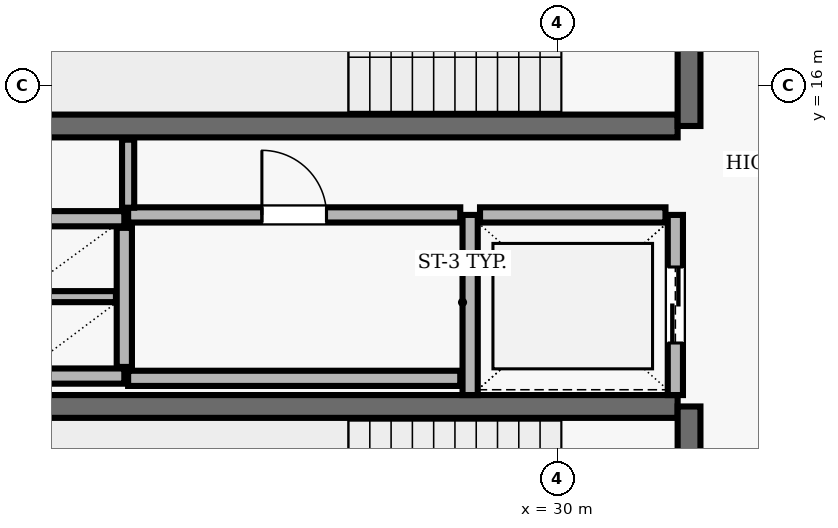
"""IFC4 building model, lengths in metres.
Left out: names, types, materials, properties, quantities, classifications, styles, units other than length and angle.
Written with IfcOpenShell. Run it as: python <this file> out.ifc"""

import sys

from ifc_helpers import new_model, si_unit, direction, frame, frame_2d, origin, place, context, subcontext, project, spatial, rectangle, extrude, element, fill, save


model = new_model("IFC4")
c1 = context("Model", 3, precision=1e-05, world=origin(), true_north=direction((0.0, 1.0)))
c2 = subcontext(c1, "Body", "Model", "MODEL_VIEW")
j1 = project(units=[si_unit("LENGTHUNIT", "METRE"), si_unit("PLANEANGLEUNIT", "RADIAN")], contexts=[c1])
p1 = place(None, origin())
s1 = spatial("IfcSite", under=j1, at=p1, CompositionType="ELEMENT")
p2 = place(p1, origin())
s2 = spatial("IfcBuilding", under=s1, at=p2, CompositionType="ELEMENT")
p3 = place(p2, frame((0.0, 0.0, 248.2)))
s3 = spatial("IfcBuildingStorey", under=s2, at=p3, CompositionType="ELEMENT", Elevation=248.2)
p4 = place(p3, frame((23.22, 15.47, 0.0), z_axis=(0.0, 0.0, 1.0), x_axis=(1.0, 0.0, 0.0)))
e1 = element("IfcWall", 1, at=p4, inside=s3, PredefinedType="SHEAR", context=c2, shape_type="SweptSolid", body=[
    extrude(rectangle(XDim=8.36, YDim=0.3, at=frame_2d((4.18, 0.0))), origin(), (0.0, 0.0, 1.0), 3.69),
])
p5 = place(p3, frame((31.73, 15.47, 0.0), z_axis=(0.0, 0.0, 1.0), x_axis=(0.0, 1.0, 0.0)))
e2 = element("IfcWall", 2, at=p5, inside=s3, PredefinedType="SHEAR", context=c2, shape_type="SweptSolid", body=[
    extrude(rectangle(XDim=3.51, YDim=0.3, at=frame_2d((1.755, 0.0))), origin(), (0.0, 0.0, 1.0), 3.69),
])
p6 = place(p5, frame((1.18, 0.0, 0.0)))
e3 = element("IfcOpeningElement", 3, at=p6, cuts=e2, PredefinedType="OPENING", context=c2, shape_type="SweptSolid", body=[
    extrude(rectangle(XDim=1.15, YDim=2.15, at=frame_2d((0.575, 1.075))), frame((0.0, 0.16, 0.0), z_axis=(0.0, -1.0, 0.0), x_axis=(1.0, 0.0, 0.0)), (0.0, 0.0, 1.0), 0.32),
])
p7 = place(p3, frame((31.58, 11.78, 0.0), z_axis=(0.0, 0.0, 1.0), x_axis=(-1.0, 0.0, 0.0)))
e4 = element("IfcWall", 4, at=p7, inside=s3, PredefinedType="SHEAR", context=c2, shape_type="SweptSolid", body=[
    extrude(rectangle(XDim=8.36, YDim=0.3, at=frame_2d((4.18, 0.0))), origin(), (0.0, 0.0, 1.0), 3.69),
])
p8 = place(p3, frame((31.73, 8.27, 0.0), z_axis=(0.0, 0.0, 1.0), x_axis=(0.0, 1.0, 0.0)))
e5 = element("IfcWall", 5, at=p8, inside=s3, PredefinedType="SHEAR", context=c2, shape_type="SweptSolid", body=[
    extrude(rectangle(XDim=3.51, YDim=0.3, at=frame_2d((1.755, 0.0))), origin(), (0.0, 0.0, 1.0), 3.69),
])
p9 = place(p8, frame((1.18, 0.0, 0.0)))
e6 = element("IfcOpeningElement", 6, at=p9, cuts=e5, PredefinedType="OPENING", context=c2, shape_type="SweptSolid", body=[
    extrude(rectangle(XDim=1.15, YDim=2.15, at=frame_2d((0.575, 1.075))), frame((0.0, 0.16, 0.0), z_axis=(0.0, -1.0, 0.0), x_axis=(1.0, 0.0, 0.0)), (0.0, 0.0, 1.0), 0.32),
])
p10 = place(p3, frame((28.85, 14.3, 0.0), z_axis=(0.0, 0.0, 1.0), x_axis=(0.0, -1.0, 0.0)))
e7 = element("IfcWall", 7, at=p10, inside=s3, PredefinedType="SOLIDWALL", context=c2, shape_type="SweptSolid", body=[
    extrude(rectangle(XDim=2.37, YDim=0.2, at=frame_2d((1.185, 0.0))), origin(), (0.0, 0.0, 1.0), 3.69),
])
p11 = place(p3, frame((31.55, 11.93, 0.0), z_axis=(0.0, 0.0, 1.0), x_axis=(0.0, 1.0, 0.0)))
e8 = element("IfcWall", 8, at=p11, inside=s3, PredefinedType="SOLIDWALL", context=c2, shape_type="SweptSolid", body=[
    extrude(rectangle(XDim=2.37, YDim=0.2, at=frame_2d((1.185, 0.0))), origin(), (0.0, 0.0, 1.0), 3.69),
])
p12 = place(p11, frame((0.685, 0.0, 0.0)))
e9 = element("IfcOpeningElement", 9, at=p12, cuts=e8, PredefinedType="OPENING", context=c2, shape_type="SweptSolid", body=[
    extrude(rectangle(XDim=1.0, YDim=2.1, at=frame_2d((0.5, 1.05))), frame((0.0, 0.11, 0.0), z_axis=(0.0, -1.0, 0.0), x_axis=(1.0, 0.0, 0.0)), (0.0, 0.0, 1.0), 0.22),
])
p13 = place(p3, frame((31.42, 14.3, 0.0), z_axis=(0.0, 0.0, 1.0), x_axis=(-1.0, 0.0, 0.0)))
e10 = element("IfcWall", 10, at=p13, inside=s3, PredefinedType="SOLIDWALL", context=c2, shape_type="SweptSolid", body=[
    extrude(rectangle(XDim=2.44, YDim=0.2, at=frame_2d((1.22, 0.0))), origin(), (0.0, 0.0, 1.0), 3.69),
])
for number, where, z_axis, x_axis in (
    (11, (22.9, 14.25, 0.0), (0.0, 0.0, 1.0), (1.0, 0.0, 0.0)),
    (12, (22.9, 12.18, 0.0), (0.0, 0.0, 1.0), (1.0, 0.0, 0.0)),
):
    element("IfcWall", number, at=place(p3, frame(where, z_axis=z_axis, x_axis=x_axis)), inside=s3, PredefinedType="SOLIDWALL", context=c2, shape_type="SweptSolid", body=[
        extrude(rectangle(XDim=1.4, YDim=0.2, at=frame_2d((0.7, 0.0))), origin(), (0.0, 0.0, 1.0), 3.69),
    ])
p14 = place(p3, frame((24.3, 12.3, 0.0), z_axis=(0.0, 0.0, 1.0), x_axis=(0.0, 1.0, 0.0)))
e13 = element("IfcWall", 13, at=p14, inside=s3, PredefinedType="SOLIDWALL", context=c2, shape_type="SweptSolid", body=[
    extrude(rectangle(XDim=1.83, YDim=0.2, at=frame_2d((0.915, 0.0))), origin(), (0.0, 0.0, 1.0), 3.69),
])
p15 = place(p3, frame((23.01, 13.225, 0.0), z_axis=(0.0, 0.0, 1.0), x_axis=(1.0, 0.0, 0.0)))
e14 = element("IfcWall", 14, at=p15, inside=s3, PredefinedType="PARTITIONING", context=c2, shape_type="SweptSolid", body=[
    extrude(rectangle(XDim=1.18, YDim=0.145, at=frame_2d((0.59, 0.0))), origin(), (0.0, 0.0, 1.0), 3.69),
])
p16 = place(p3, frame((24.35, 12.15, 0.0), z_axis=(0.0, 0.0, 1.0), x_axis=(1.0, 0.0, 0.0)))
e15 = element("IfcWall", 15, at=p16, inside=s3, PredefinedType="SOLIDWALL", context=c2, shape_type="SweptSolid", body=[
    extrude(rectangle(XDim=4.37, YDim=0.2, at=frame_2d((2.185, 0.0))), origin(), (0.0, 0.0, 1.0), 3.69),
])
p17 = place(p3, frame((24.35, 14.3, 0.0), z_axis=(0.0, 0.0, 1.0), x_axis=(1.0, 0.0, 0.0)))
e16 = element("IfcWall", 16, at=p17, inside=s3, PredefinedType="SOLIDWALL", context=c2, shape_type="SweptSolid", body=[
    extrude(rectangle(XDim=4.37, YDim=0.2, at=frame_2d((2.185, 0.0))), origin(), (0.0, 0.0, 1.0), 3.69),
])
p18 = place(p17, frame((1.76, 0.0, 0.0)))
e17 = element("IfcOpeningElement", 17, at=p18, cuts=e16, PredefinedType="OPENING", context=c2, shape_type="SweptSolid", body=[
    extrude(rectangle(XDim=0.85, YDim=2.1, at=frame_2d((0.425, 1.05))), frame((0.0, 0.11, 0.0), z_axis=(0.0, -1.0, 0.0), x_axis=(1.0, 0.0, 0.0)), (0.0, 0.0, 1.0), 0.22),
])
p19 = place(p3, frame((24.35, 15.29, 0.0), z_axis=(0.0, 0.0, 1.0), x_axis=(0.0, -1.0, 0.0)))
e18 = element("IfcWall", 18, at=p19, inside=s3, PredefinedType="PARTITIONING", context=c2, shape_type="SweptSolid", body=[
    extrude(rectangle(XDim=0.895, YDim=0.16, at=frame_2d((0.448, 0.0))), origin(), (0.0, 0.0, 1.0), 3.69),
])
p20 = place(p12, origin())
e19 = element("IfcDoor", 19, at=p20, inside=s3, OperationType="DOUBLE_DOOR_SLIDING", PredefinedType="DOOR", context=c2, shape_type="SweptSolid", body=[
    extrude(rectangle(XDim=1.0, YDim=2.1, at=frame_2d((0.5, 1.05))), frame((0.0, 0.025, 0.0), z_axis=(0.0, -1.0, 0.0), x_axis=(1.0, 0.0, 0.0)), (0.0, 0.0, 1.0), 0.05),
])
fill(e9, e19)
p21 = place(p18, origin())
e20 = element("IfcDoor", 20, at=p21, inside=s3, OperationType="SINGLE_SWING_LEFT", PredefinedType="DOOR", context=c2, shape_type="SweptSolid", body=[
    extrude(rectangle(XDim=0.85, YDim=2.1, at=frame_2d((0.425, 1.05))), frame((0.0, 0.025, 0.0), z_axis=(0.0, -1.0, 0.0), x_axis=(1.0, 0.0, 0.0)), (0.0, 0.0, 1.0), 0.05),
])
fill(e17, e20)
save(model, sys.argv[1])
